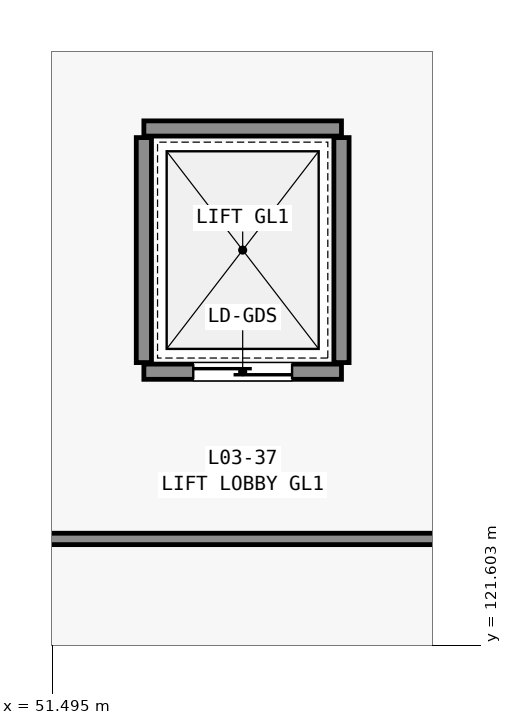
"""IFC4 building model, lengths in metres.
Left out: names, types, materials, properties, quantities, classifications, styles, units other than length and angle.
Written with IfcOpenShell. Run it as: python <this file> out.ifc"""

import sys

from ifc_helpers import new_model, si_unit, direction, frame, frame_2d, origin, place, context, subcontext, project, spatial, rectangle, extrude, element, fill, save


model = new_model("IFC4")
c1 = context("Model", 3, precision=1e-05, world=origin(), true_north=direction((0.0, 1.0)))
c2 = subcontext(c1, "Body", "Model", "MODEL_VIEW")
j1 = project(units=[si_unit("LENGTHUNIT", "METRE"), si_unit("PLANEANGLEUNIT", "RADIAN")], contexts=[c1])
p1 = place(None, origin())
s1 = spatial("IfcSite", under=j1, at=p1, CompositionType="ELEMENT")
p2 = place(p1, origin())
s2 = spatial("IfcBuilding", under=s1, at=p2, CompositionType="ELEMENT")
p3 = place(p2, frame((0.0, 0.0, 16.2)))
s3 = spatial("IfcBuildingStorey", under=s2, at=p3, CompositionType="ELEMENT", Elevation=16.2)
p4 = place(p3, frame((52.7, 125.2, 0.0), z_axis=(0.0, 0.0, 1.0), x_axis=(1.0, 0.0, 0.0)))
e1 = element("IfcWall", 1, at=p4, inside=s3, PredefinedType="STANDARD", context=c2, shape_type="SweptSolid", body=[
    extrude(rectangle(XDim=2.6, YDim=0.2, at=frame_2d((1.3, 0.0))), origin(), (0.0, 0.0, 1.0), 4.46),
])
p5 = place(p4, frame((0.65, 0.0, 0.0)))
e2 = element("IfcOpeningElement", 2, at=p5, cuts=e1, PredefinedType="OPENING", context=c2, shape_type="SweptSolid", body=[
    extrude(rectangle(XDim=1.3, YDim=2.15, at=frame_2d((0.65, 1.075))), frame((0.0, 0.11, 0.0), z_axis=(0.0, -1.0, 0.0), x_axis=(1.0, 0.0, 0.0)), (0.0, 0.0, 1.0), 0.22),
])
p6 = place(p3, frame((52.7, 128.4, 0.0), z_axis=(0.0, 0.0, 1.0), x_axis=(1.0, 0.0, 0.0)))
e3 = element("IfcWall", 3, at=p6, inside=s3, PredefinedType="STANDARD", context=c2, shape_type="SweptSolid", body=[
    extrude(rectangle(XDim=2.6, YDim=0.2, at=frame_2d((1.3, 0.0))), origin(), (0.0, 0.0, 1.0), 4.46),
])
for number, where, z_axis, x_axis in (
    (4, (52.7, 125.32, 0.0), (0.0, 0.0, 1.0), (0.0, 1.0, 0.0)),
    (5, (55.3, 125.32, 0.0), (0.0, 0.0, 1.0), (0.0, 1.0, 0.0)),
):
    element("IfcWall", number, at=place(p3, frame(where, z_axis=z_axis, x_axis=x_axis)), inside=s3, PredefinedType="STANDARD", context=c2, shape_type="SweptSolid", body=[
        extrude(rectangle(XDim=2.96, YDim=0.2, at=frame_2d((1.48, 0.0))), origin(), (0.0, 0.0, 1.0), 4.46),
    ])
p7 = place(p3, frame((41.5, 123.0, 0.0), z_axis=(0.0, 0.0, 1.0), x_axis=(1.0, 0.0, 0.0)))
e6 = element("IfcWall", 6, at=p7, inside=s3, PredefinedType="STANDARD", context=c2, shape_type="SweptSolid", body=[
    extrude(rectangle(XDim=35.0, YDim=0.15, at=frame_2d((17.5, 0.0))), origin(), (0.0, 0.0, 1.0), 3.848),
])
p8 = place(p5, origin())
e7 = element("IfcDoor", 7, at=p8, inside=s3, OperationType="SLIDING_TO_LEFT", PredefinedType="DOOR", context=c2, shape_type="SweptSolid", body=[
    extrude(rectangle(XDim=1.3, YDim=2.15, at=frame_2d((0.65, 1.075))), frame((0.0, 0.025, 0.0), z_axis=(0.0, -1.0, 0.0), x_axis=(1.0, 0.0, 0.0)), (0.0, 0.0, 1.0), 0.05),
])
fill(e2, e7)
save(model, sys.argv[1])
